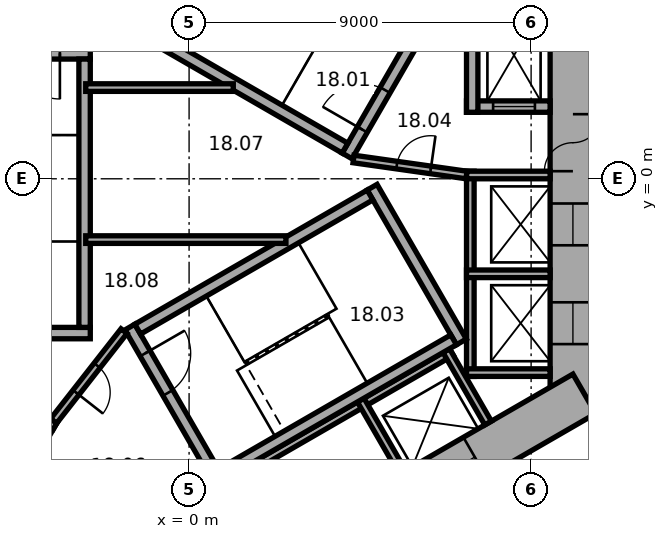
"""IFC4 building model, lengths in metres.
Left out: names, types, materials, properties, quantities, classifications, styles, units other than length and angle.
Written with IfcOpenShell. Run it as: python <this file> out.ifc"""

import sys

from ifc_helpers import new_model, si_unit, direction, frame, frame_2d, origin, place, context, subcontext, project, spatial, rectangle, extrude, element, fill, save


model = new_model("IFC4")
c1 = context("Model", 3, precision=1e-05, world=origin(), true_north=direction((0.0, 1.0)))
c2 = subcontext(c1, "Body", "Model", "MODEL_VIEW")
j1 = project(units=[si_unit("LENGTHUNIT", "METRE"), si_unit("PLANEANGLEUNIT", "RADIAN")], contexts=[c1])
p1 = place(None, origin())
s1 = spatial("IfcSite", under=j1, at=p1, CompositionType="ELEMENT")
p2 = place(p1, origin())
s2 = spatial("IfcBuilding", under=s1, at=p2, CompositionType="ELEMENT")
p3 = place(p2, frame((0.0, 0.0, 83.6)))
s3 = spatial("IfcBuildingStorey", under=s2, at=p3, CompositionType="ELEMENT", Elevation=83.6)
p4 = place(p3, frame((10.1, -6.177, 0.0), z_axis=(0.0, 0.0, 1.0), x_axis=(0.0, 1.0, 0.0)))
e1 = element("IfcWall", 1, at=p4, inside=s3, PredefinedType="SHEAR", context=c2, shape_type="SweptSolid", body=[
    extrude(rectangle(XDim=12.355, YDim=1.2, at=frame_2d((6.177, 0.0))), origin(), (0.0, 0.0, 1.0), 3.3),
])
p5 = place(p4, frame((6.378, 0.0, 0.0)))
e2 = element("IfcOpeningElement", 2, at=p5, cuts=e1, PredefinedType="OPENING", context=c2, shape_type="SweptSolid", body=[
    extrude(rectangle(XDim=1.5, YDim=2.1, at=frame_2d((0.75, 1.05))), frame((0.0, 0.61, 0.0), z_axis=(0.0, -1.0, 0.0), x_axis=(1.0, 0.0, 0.0)), (0.0, 0.0, 1.0), 1.22),
])
p6 = place(p4, frame((1.828, 0.0, 0.0)))
e3 = element("IfcOpeningElement", 3, at=p6, cuts=e1, PredefinedType="OPENING", context=c2, shape_type="SweptSolid", body=[
    extrude(rectangle(XDim=1.1, YDim=2.1, at=frame_2d((0.55, 1.05))), frame((0.0, 0.61, 0.0), z_axis=(0.0, -1.0, 0.0), x_axis=(1.0, 0.0, 0.0)), (0.0, 0.0, 1.0), 1.22),
])
p7 = place(p4, frame((4.427, 0.0, 0.0)))
e4 = element("IfcOpeningElement", 4, at=p7, cuts=e1, PredefinedType="OPENING", context=c2, shape_type="SweptSolid", body=[
    extrude(rectangle(XDim=1.1, YDim=2.1, at=frame_2d((0.55, 1.05))), frame((0.0, 0.61, 0.0), z_axis=(0.0, -1.0, 0.0), x_axis=(1.0, 0.0, 0.0)), (0.0, 0.0, 1.0), 1.22),
])
p8 = place(p3, frame((-10.4, -5.658, 0.0), z_axis=(0.0, 0.0, 1.0), x_axis=(0.866021384402, -0.500006961711, 0.0)))
e5 = element("IfcWall", 5, at=p8, inside=s3, PredefinedType="SHEAR", context=c2, shape_type="SweptSolid", body=[
    extrude(rectangle(XDim=12.355, YDim=1.2, at=frame_2d((6.178, 0.0))), origin(), (0.0, 0.0, 1.0), 3.3),
])
p9 = place(p8, frame((6.378, 0.0, 0.0)))
e6 = element("IfcOpeningElement", 6, at=p9, cuts=e5, PredefinedType="OPENING", context=c2, shape_type="SweptSolid", body=[
    extrude(rectangle(XDim=1.5, YDim=2.1, at=frame_2d((0.75, 1.05))), frame((0.0, 0.61, 0.0), z_axis=(0.0, -1.0, 0.0), x_axis=(1.0, 0.0, 0.0)), (0.0, 0.0, 1.0), 1.22),
])
p10 = place(p8, frame((3.228, 0.0, 0.0)))
e7 = element("IfcOpeningElement", 7, at=p10, cuts=e5, PredefinedType="OPENING", context=c2, shape_type="SweptSolid", body=[
    extrude(rectangle(XDim=0.9, YDim=2.1, at=frame_2d((0.45, 1.05))), frame((0.0, 0.61, 0.0), z_axis=(0.0, -1.0, 0.0), x_axis=(1.0, 0.0, 0.0)), (0.0, 0.0, 1.0), 1.22),
])
p11 = place(p3, frame((-0.3, -11.836, 0.0), z_axis=(0.0, 0.0, 1.0), x_axis=(0.866021384402, 0.500006961711, 0.0)))
e8 = element("IfcWall", 8, at=p11, inside=s3, PredefinedType="SHEAR", context=c2, shape_type="SweptSolid", body=[
    extrude(rectangle(XDim=12.355, YDim=1.2, at=frame_2d((6.178, 0.0))), origin(), (0.0, 0.0, 1.0), 3.3),
])
p12 = place(p11, frame((4.128, 0.0, 0.0)))
e9 = element("IfcOpeningElement", 9, at=p12, cuts=e8, PredefinedType="OPENING", context=c2, shape_type="SweptSolid", body=[
    extrude(rectangle(XDim=0.9, YDim=2.1, at=frame_2d((0.45, 1.05))), frame((0.0, 0.61, 0.0), z_axis=(0.0, -1.0, 0.0), x_axis=(1.0, 0.0, 0.0)), (0.0, 0.0, 1.0), 1.22),
])
p13 = place(p11, frame((7.928, 0.0, 0.0)))
e10 = element("IfcOpeningElement", 10, at=p13, cuts=e8, PredefinedType="OPENING", context=c2, shape_type="SweptSolid", body=[
    extrude(rectangle(XDim=1.1, YDim=2.1, at=frame_2d((0.55, 1.05))), frame((0.0, 0.61, 0.0), z_axis=(0.0, -1.0, 0.0), x_axis=(1.0, 0.0, 0.0)), (0.0, 0.0, 1.0), 1.22),
])
p14 = place(p3, frame((7.4, -5.2, 0.0), z_axis=(0.0, 0.0, 1.0), x_axis=(0.0, 1.0, 0.0)))
e11 = element("IfcWall", 11, at=p14, inside=s3, PredefinedType="PARTITIONING", context=c2, shape_type="SweptSolid", body=[
    extrude(rectangle(XDim=5.4, YDim=0.2, at=frame_2d((2.7, 0.0))), origin(), (0.0, 0.0, 1.0), 3.05),
])
for number, where, z_axis, x_axis in (
    (12, (7.3, -5.1, 0.0), (0.0, 0.0, 1.0), (1.0, 0.0, 0.0)),
    (13, (7.3, -2.5, 0.0), (0.0, 0.0, 1.0), (1.0, 0.0, 0.0)),
    (14, (7.3, 0.1, 0.0), (0.0, 0.0, 1.0), (1.0, 0.0, 0.0)),
):
    element("IfcWall", number, at=place(p3, frame(where, z_axis=z_axis, x_axis=x_axis)), inside=s3, PredefinedType="PARTITIONING", context=c2, shape_type="SweptSolid", body=[
        extrude(rectangle(XDim=2.2, YDim=0.2, at=frame_2d((1.1, 0.0))), origin(), (0.0, 0.0, 1.0), 3.05),
    ])
p15 = place(p3, frame((-8.203, -3.809, 0.0), z_axis=(0.0, 0.0, 1.0), x_axis=(0.866028230842, -0.499995103361, 0.0)))
e15 = element("IfcWall", 15, at=p15, inside=s3, PredefinedType="PARTITIONING", context=c2, shape_type="SweptSolid", body=[
    extrude(rectangle(XDim=5.4, YDim=0.2, at=frame_2d((2.7, 0.0))), origin(), (0.0, 0.0, 1.0), 3.05),
])
p16 = place(p3, frame((-3.563, -6.372, 0.0), z_axis=(0.0, 0.0, 1.0), x_axis=(-0.499994660107, -0.866028486751, 0.0)))
e16 = element("IfcWall", 16, at=p16, inside=s3, PredefinedType="PARTITIONING", context=c2, shape_type="SweptSolid", body=[
    extrude(rectangle(XDim=2.2, YDim=0.2, at=frame_2d((1.1, 0.0))), origin(), (0.0, 0.0, 1.0), 3.05),
])
p17 = place(p3, frame((-0.024, -8.559, 0.0), z_axis=(0.0, 0.0, 1.0), x_axis=(0.866026010844, 0.49999894854, 0.0)))
e17 = element("IfcWall", 17, at=p17, inside=s3, PredefinedType="PARTITIONING", context=c2, shape_type="SweptSolid", body=[
    extrude(rectangle(XDim=8.0, YDim=0.2, at=frame_2d((4.0, 0.0))), origin(), (0.0, 0.0, 1.0), 3.05),
])
for number, where, z_axis, x_axis in (
    (18, (4.516, -5.822, 0.0), (0.0, 0.0, 1.0), (0.5, -0.866, 0.0)),
    (19, (6.768, -4.522, 0.0), (0.0, 0.0, 1.0), (0.5, -0.866, 0.0)),
):
    element("IfcWall", number, at=place(p3, frame(where, z_axis=z_axis, x_axis=x_axis)), inside=s3, PredefinedType="PARTITIONING", context=c2, shape_type="SweptSolid", body=[
        extrude(rectangle(XDim=2.2, YDim=0.2, at=frame_2d((1.1, 0.0))), origin(), (0.0, 0.0, 1.0), 3.05),
    ])
p18 = place(p3, frame((4.158, 0.602, 0.0), z_axis=(0.0, 0.0, 1.0), x_axis=(0.499977259774, 0.866038532462, 0.0)))
e20 = element("IfcWall", 20, at=p18, inside=s3, PredefinedType="SHEAR", context=c2, shape_type="SweptSolid", body=[
    extrude(rectangle(XDim=4.7, YDim=0.3, at=frame_2d((2.35, 0.0))), origin(), (0.0, 0.0, 1.0), 3.05),
])
p19 = place(p18, frame((0.8, 0.0, 0.0)))
e21 = element("IfcOpeningElement", 21, at=p19, cuts=e20, PredefinedType="OPENING", context=c2, shape_type="SweptSolid", body=[
    extrude(rectangle(XDim=1.2, YDim=2.1, at=frame_2d((0.6, 1.05))), frame((0.0, 0.16, 0.0), z_axis=(0.0, -1.0, 0.0), x_axis=(1.0, 0.0, 0.0)), (0.0, 0.0, 1.0), 0.32),
])
p20 = place(p3, frame((4.103, 0.807, 0.0), z_axis=(0.0, 0.0, 1.0), x_axis=(-0.866027801685, 0.499995846692, 0.0)))
e22 = element("IfcWall", 22, at=p20, inside=s3, PredefinedType="SHEAR", context=c2, shape_type="SweptSolid", body=[
    extrude(rectangle(XDim=7.06, YDim=0.3, at=frame_2d((3.53, 0.0))), origin(), (0.0, 0.0, 1.0), 3.05),
])
p21 = place(p3, frame((-2.6, 3.3, 0.0), z_axis=(0.0, 0.0, 1.0), x_axis=(-1.0, 0.0, 0.0)))
e23 = element("IfcWall", 23, at=p21, inside=s3, PredefinedType="SHEAR", context=c2, shape_type="SweptSolid", body=[
    extrude(rectangle(XDim=4.7, YDim=0.3, at=frame_2d((2.35, 0.0))), origin(), (0.0, 0.0, 1.0), 3.05),
])
p22 = place(p21, frame((0.8, 0.0, 0.0)))
e24 = element("IfcOpeningElement", 24, at=p22, cuts=e23, PredefinedType="OPENING", context=c2, shape_type="SweptSolid", body=[
    extrude(rectangle(XDim=1.2, YDim=2.1, at=frame_2d((0.6, 1.05))), frame((0.0, 0.16, 0.0), z_axis=(0.0, -1.0, 0.0), x_axis=(1.0, 0.0, 0.0)), (0.0, 0.0, 1.0), 0.32),
])
p23 = place(p3, frame((-2.6, -4.06, 0.0), z_axis=(0.0, 0.0, 1.0), x_axis=(-1.0, 0.0, 0.0)))
e25 = element("IfcWall", 25, at=p23, inside=s3, PredefinedType="SHEAR", context=c2, shape_type="SweptSolid", body=[
    extrude(rectangle(XDim=4.7, YDim=0.3, at=frame_2d((2.35, 0.0))), origin(), (0.0, 0.0, 1.0), 3.05),
])
p24 = place(p3, frame((-2.75, 3.15, 0.0), z_axis=(0.0, 0.0, 1.0), x_axis=(0.0, -1.0, 0.0)))
e26 = element("IfcWall", 26, at=p24, inside=s3, PredefinedType="SHEAR", context=c2, shape_type="SweptSolid", body=[
    extrude(rectangle(XDim=7.06, YDim=0.3, at=frame_2d((3.53, 0.0))), origin(), (0.0, 0.0, 1.0), 3.05),
])
p25 = place(p3, frame((-1.558, -3.902, 0.0), z_axis=(0.0, 0.0, 1.0), x_axis=(0.499977259774, -0.866038532462, 0.0)))
e27 = element("IfcWall", 27, at=p25, inside=s3, PredefinedType="SHEAR", context=c2, shape_type="SweptSolid", body=[
    extrude(rectangle(XDim=4.7, YDim=0.3, at=frame_2d((2.35, 0.0))), origin(), (0.0, 0.0, 1.0), 3.05),
])
p26 = place(p25, frame((0.8, 0.0, 0.0)))
e28 = element("IfcOpeningElement", 28, at=p26, cuts=e27, PredefinedType="OPENING", context=c2, shape_type="SweptSolid", body=[
    extrude(rectangle(XDim=1.2, YDim=2.1, at=frame_2d((0.6, 1.05))), frame((0.0, 0.16, 0.0), z_axis=(0.0, -1.0, 0.0), x_axis=(1.0, 0.0, 0.0)), (0.0, 0.0, 1.0), 0.32),
])
p27 = place(p3, frame((4.816, -0.222, 0.0), z_axis=(0.0, 0.0, 1.0), x_axis=(0.499977259774, -0.866038532462, 0.0)))
e29 = element("IfcWall", 29, at=p27, inside=s3, PredefinedType="SHEAR", context=c2, shape_type="SweptSolid", body=[
    extrude(rectangle(XDim=4.7, YDim=0.3, at=frame_2d((2.35, 0.0))), origin(), (0.0, 0.0, 1.0), 3.05),
])
for number, where, z_axis, x_axis in (
    (30, (-1.353, -3.957, 0.0), (0.0, 0.0, 1.0), (0.866, 0.5, 0.0)),
    (31, (0.847, -7.767, 0.0), (0.0, 0.0, 1.0), (0.866, 0.5, 0.0)),
):
    element("IfcWall", number, at=place(p3, frame(where, z_axis=z_axis, x_axis=x_axis)), inside=s3, PredefinedType="SHEAR", context=c2, shape_type="SweptSolid", body=[
        extrude(rectangle(XDim=7.06, YDim=0.3, at=frame_2d((3.53, 0.0))), origin(), (0.0, 0.0, 1.0), 3.05),
    ])
p28 = place(p3, frame((7.3, 1.9, 0.0), z_axis=(0.0, 0.0, 1.0), x_axis=(1.0, 0.0, 0.0)))
e32 = element("IfcWall", 32, at=p28, inside=s3, PredefinedType="SHEAR", context=c2, shape_type="SweptSolid", body=[
    extrude(rectangle(XDim=2.2, YDim=0.3, at=frame_2d((1.1, 0.0))), origin(), (0.0, 0.0, 1.0), 3.05),
])
p29 = place(p28, frame((0.7, 0.0, 0.0)))
e33 = element("IfcOpeningElement", 33, at=p29, cuts=e32, PredefinedType="OPENING", context=c2, shape_type="SweptSolid", body=[
    extrude(rectangle(XDim=1.1, YDim=2.1, at=frame_2d((0.55, 1.05))), frame((0.0, 0.16, 0.0), z_axis=(0.0, -1.0, 0.0), x_axis=(1.0, 0.0, 0.0)), (0.0, 0.0, 1.0), 0.32),
])
p30 = place(p3, frame((7.45, 1.75, 0.0), z_axis=(0.0, 0.0, 1.0), x_axis=(0.0, 1.0, 0.0)))
e34 = element("IfcWall", 34, at=p30, inside=s3, PredefinedType="SHEAR", context=c2, shape_type="SweptSolid", body=[
    extrude(rectangle(XDim=3.35, YDim=0.3, at=frame_2d((1.675, 0.0))), origin(), (0.0, 0.0, 1.0), 3.05),
])
p31 = place(p3, frame((4.327, 0.521, 0.0), z_axis=(0.0, 0.0, 1.0), x_axis=(0.990124376366, -0.14019172346, 0.0)))
e35 = element("IfcWall", 35, at=p31, inside=s3, PredefinedType="PARTITIONING", context=c2, shape_type="SweptSolid", body=[
    extrude(rectangle(XDim=3.002, YDim=0.2, at=frame_2d((1.501, 0.0))), origin(), (0.0, 0.0, 1.0), 3.05),
])
p32 = place(p31, frame((1.15, 0.0, 0.0)))
e36 = element("IfcOpeningElement", 36, at=p32, cuts=e35, PredefinedType="OPENING", context=c2, shape_type="SweptSolid", body=[
    extrude(rectangle(XDim=0.9, YDim=2.1, at=frame_2d((0.45, 1.05))), frame((0.0, 0.11, 0.0), z_axis=(0.0, -1.0, 0.0), x_axis=(1.0, 0.0, 0.0)), (0.0, 0.0, 1.0), 0.22),
])
p33 = place(p3, frame((-1.712, -4.008, 0.0), z_axis=(0.0, 0.0, 1.0), x_axis=(-0.616549420702, -0.787316208287, 0.0)))
e37 = element("IfcWall", 37, at=p33, inside=s3, PredefinedType="PARTITIONING", context=c2, shape_type="SweptSolid", body=[
    extrude(rectangle(XDim=3.002, YDim=0.2, at=frame_2d((1.501, 0.0))), origin(), (0.0, 0.0, 1.0), 3.05),
])
p34 = place(p33, frame((1.15, 0.0, 0.0)))
e38 = element("IfcOpeningElement", 38, at=p34, cuts=e37, PredefinedType="OPENING", context=c2, shape_type="SweptSolid", body=[
    extrude(rectangle(XDim=0.9, YDim=2.1, at=frame_2d((0.45, 1.05))), frame((0.0, 0.11, 0.0), z_axis=(0.0, -1.0, 0.0), x_axis=(1.0, 0.0, 0.0)), (0.0, 0.0, 1.0), 0.22),
])
p35 = place(p3, frame((-2.72, -1.6, 0.0), z_axis=(0.0, 0.0, 1.0), x_axis=(1.0, 0.0, 0.0)))
e39 = element("IfcWall", 39, at=p35, inside=s3, PredefinedType="PARTITIONING", context=c2, shape_type="SweptSolid", body=[
    extrude(rectangle(XDim=5.269, YDim=0.2, at=frame_2d((2.634, 0.0))), origin(), (0.0, 0.0, 1.0), 3.05),
])
p36 = place(p3, frame((-2.72, 2.4, 0.0), z_axis=(0.0, 0.0, 1.0), x_axis=(1.0, 0.0, 0.0)))
e40 = element("IfcWall", 40, at=p36, inside=s3, PredefinedType="PARTITIONING", context=c2, shape_type="SweptSolid", body=[
    extrude(rectangle(XDim=3.883, YDim=0.2, at=frame_2d((1.941, 0.0))), origin(), (0.0, 0.0, 1.0), 3.05),
])
p37 = place(p5, origin())
e41 = element("IfcDoor", 41, at=p37, inside=s3, OperationType="DOUBLE_DOOR_SINGLE_SWING", PredefinedType="DOOR", context=c2, shape_type="SweptSolid", body=[
    extrude(rectangle(XDim=1.5, YDim=2.1, at=frame_2d((0.75, 1.05))), frame((0.0, 0.025, 0.0), z_axis=(0.0, -1.0, 0.0), x_axis=(1.0, 0.0, 0.0)), (0.0, 0.0, 1.0), 0.05),
])
fill(e2, e41)
p38 = place(p19, origin())
e42 = element("IfcDoor", 42, at=p38, inside=s3, OperationType="SINGLE_SWING_RIGHT", PredefinedType="DOOR", context=c2, shape_type="SweptSolid", body=[
    extrude(rectangle(XDim=1.2, YDim=2.1, at=frame_2d((0.6, 1.05))), frame((0.0, 0.025, 0.0), z_axis=(0.0, -1.0, 0.0), x_axis=(1.0, 0.0, 0.0)), (0.0, 0.0, 1.0), 0.05),
])
fill(e21, e42)
p39 = place(p22, origin())
e43 = element("IfcDoor", 43, at=p39, inside=s3, OperationType="SINGLE_SWING_RIGHT", PredefinedType="DOOR", context=c2, shape_type="SweptSolid", body=[
    extrude(rectangle(XDim=1.2, YDim=2.1, at=frame_2d((0.6, 1.05))), frame((0.0, 0.025, 0.0), z_axis=(0.0, -1.0, 0.0), x_axis=(1.0, 0.0, 0.0)), (0.0, 0.0, 1.0), 0.05),
])
fill(e24, e43)
p40 = place(p26, origin())
e44 = element("IfcDoor", 44, at=p40, inside=s3, OperationType="SINGLE_SWING_RIGHT", PredefinedType="DOOR", context=c2, shape_type="SweptSolid", body=[
    extrude(rectangle(XDim=1.2, YDim=2.1, at=frame_2d((0.6, 1.05))), frame((0.0, 0.025, 0.0), z_axis=(0.0, -1.0, 0.0), x_axis=(1.0, 0.0, 0.0)), (0.0, 0.0, 1.0), 0.05),
])
fill(e28, e44)
p41 = place(p32, origin())
e45 = element("IfcDoor", 45, at=p41, inside=s3, OperationType="SINGLE_SWING_LEFT", PredefinedType="DOOR", context=c2, shape_type="SweptSolid", body=[
    extrude(rectangle(XDim=0.9, YDim=2.1, at=frame_2d((0.45, 1.05))), frame((0.0, 0.025, 0.0), z_axis=(0.0, -1.0, 0.0), x_axis=(1.0, 0.0, 0.0)), (0.0, 0.0, 1.0), 0.05),
])
fill(e36, e45)
p42 = place(p34, origin())
e46 = element("IfcDoor", 46, at=p42, inside=s3, OperationType="SINGLE_SWING_LEFT", PredefinedType="DOOR", context=c2, shape_type="SweptSolid", body=[
    extrude(rectangle(XDim=0.9, YDim=2.1, at=frame_2d((0.45, 1.05))), frame((0.0, 0.025, 0.0), z_axis=(0.0, -1.0, 0.0), x_axis=(1.0, 0.0, 0.0)), (0.0, 0.0, 1.0), 0.05),
])
fill(e38, e46)
p43 = place(p29, origin())
e47 = element("IfcDoor", 47, at=p43, inside=s3, OperationType="DOUBLE_DOOR_SLIDING", PredefinedType="DOOR", context=c2, shape_type="SweptSolid", body=[
    extrude(rectangle(XDim=1.1, YDim=2.1, at=frame_2d((0.55, 1.05))), frame((0.0, 0.025, 0.0), z_axis=(0.0, -1.0, 0.0), x_axis=(1.0, 0.0, 0.0)), (0.0, 0.0, 1.0), 0.05),
])
fill(e33, e47)
p44 = place(p6, origin())
e48 = element("IfcDoor", 48, at=p44, inside=s3, OperationType="DOUBLE_DOOR_SLIDING", PredefinedType="DOOR", context=c2, shape_type="SweptSolid", body=[
    extrude(rectangle(XDim=1.1, YDim=2.1, at=frame_2d((0.55, 1.05))), frame((0.0, 0.025, 0.0), z_axis=(0.0, -1.0, 0.0), x_axis=(1.0, 0.0, 0.0)), (0.0, 0.0, 1.0), 0.05),
])
fill(e3, e48)
p45 = place(p7, origin())
e49 = element("IfcDoor", 49, at=p45, inside=s3, OperationType="DOUBLE_DOOR_SLIDING", PredefinedType="DOOR", context=c2, shape_type="SweptSolid", body=[
    extrude(rectangle(XDim=1.1, YDim=2.1, at=frame_2d((0.55, 1.05))), frame((0.0, 0.025, 0.0), z_axis=(0.0, -1.0, 0.0), x_axis=(1.0, 0.0, 0.0)), (0.0, 0.0, 1.0), 0.05),
])
fill(e4, e49)
p46 = place(p13, origin())
e50 = element("IfcDoor", 50, at=p46, inside=s3, OperationType="DOUBLE_DOOR_SLIDING", PredefinedType="DOOR", context=c2, shape_type="SweptSolid", body=[
    extrude(rectangle(XDim=1.1, YDim=2.1, at=frame_2d((0.55, 1.05))), frame((0.0, 0.025, 0.0), z_axis=(0.0, -1.0, 0.0), x_axis=(1.0, 0.0, 0.0)), (0.0, 0.0, 1.0), 0.05),
])
fill(e10, e50)
save(model, sys.argv[1])
